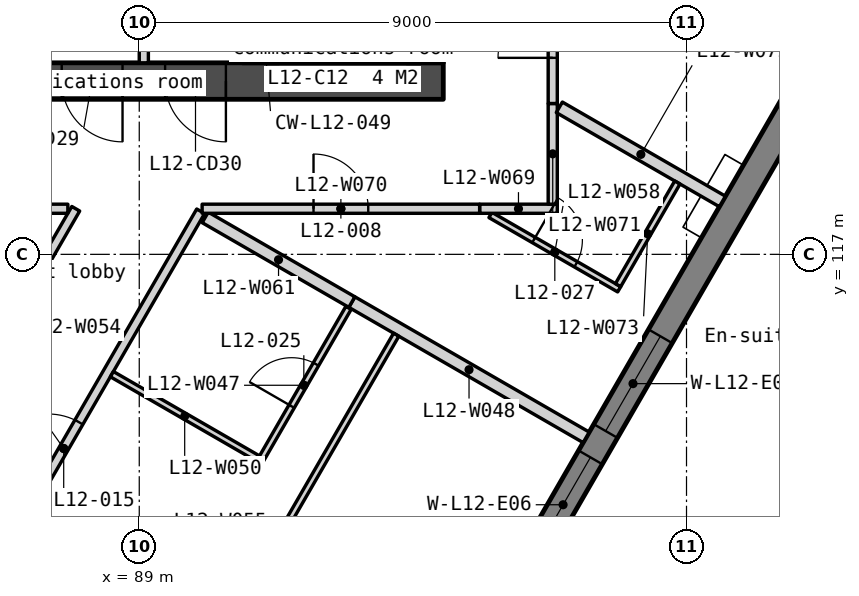
"""IFC4 building model, lengths in metres.
Left out: names, types, materials, properties, quantities, classifications, styles, units other than length and angle.
Written with IfcOpenShell. Run it as: python <this file> out.ifc"""

import sys

from ifc_helpers import new_model, si_unit, direction, frame, frame_2d, origin, place, context, subcontext, project, spatial, polyline, rectangle, outline, extrude, element, fill, save


model = new_model("IFC4")
c1 = context("Model", 3, precision=1e-05, world=origin(), true_north=direction((0.0, 1.0)))
c2 = subcontext(c1, "Body", "Model", "MODEL_VIEW")
j1 = project(units=[si_unit("LENGTHUNIT", "METRE"), si_unit("PLANEANGLEUNIT", "RADIAN")], contexts=[c1])
p1 = place(None, origin())
s1 = spatial("IfcSite", under=j1, at=p1, CompositionType="ELEMENT")
p2 = place(p1, origin())
s2 = spatial("IfcBuilding", under=s1, at=p2, CompositionType="ELEMENT")
p3 = place(p2, frame((0.0, 0.0, 56.0)))
s3 = spatial("IfcBuildingStorey", under=s2, at=p3, CompositionType="ELEMENT", Elevation=56.0)
p4 = place(p3, frame((66.0, 119.85, 0.0), z_axis=(0.0, 0.0, 1.0), x_axis=(1.0, 0.0, 0.0)))
e1 = element("IfcWall", 1, at=p4, inside=s3, PredefinedType="SOLIDWALL", context=c2, shape_type="SweptSolid", body=[
    extrude(rectangle(XDim=28.0, YDim=0.6, at=frame_2d((14.0, 0.0))), origin(), (0.0, 0.0, 1.0), 3.35),
])
p5 = place(p4, frame((6.825, 0.0, 0.0)))
e2 = element("IfcOpeningElement", 2, at=p5, cuts=e1, PredefinedType="OPENING", context=c2, shape_type="SweptSolid", body=[
    extrude(rectangle(XDim=1.8, YDim=2.1, at=frame_2d((0.9, 1.05))), frame((0.0, 0.31, 0.0), z_axis=(0.0, -1.0, 0.0), x_axis=(1.0, 0.0, 0.0)), (0.0, 0.0, 1.0), 0.62),
])
p6 = place(p4, frame((15.85, 0.0, 0.0)))
e3 = element("IfcOpeningElement", 3, at=p6, cuts=e1, PredefinedType="OPENING", context=c2, shape_type="SweptSolid", body=[
    extrude(rectangle(XDim=1.5, YDim=2.1, at=frame_2d((0.75, 1.05))), frame((0.0, 0.31, 0.0), z_axis=(0.0, -1.0, 0.0), x_axis=(1.0, 0.0, 0.0)), (0.0, 0.0, 1.0), 0.62),
])
p7 = place(p4, frame((19.375, 0.0, 0.0)))
e4 = element("IfcOpeningElement", 4, at=p7, cuts=e1, PredefinedType="OPENING", context=c2, shape_type="SweptSolid", body=[
    extrude(rectangle(XDim=1.8, YDim=2.1, at=frame_2d((0.9, 1.05))), frame((0.0, 0.31, 0.0), z_axis=(0.0, -1.0, 0.0), x_axis=(1.0, 0.0, 0.0)), (0.0, 0.0, 1.0), 0.62),
])
p8 = place(p4, frame((4.425, 0.0, 0.0)))
e5 = element("IfcOpeningElement", 5, at=p8, cuts=e1, PredefinedType="OPENING", context=c2, shape_type="SweptSolid", body=[
    extrude(rectangle(XDim=1.0, YDim=2.1, at=frame_2d((0.5, 1.05))), frame((0.0, 0.31, 0.0), z_axis=(0.0, -1.0, 0.0), x_axis=(1.0, 0.0, 0.0)), (0.0, 0.0, 1.0), 0.62),
])
p9 = place(p4, frame((9.783, 0.0, 0.0)))
e6 = element("IfcOpeningElement", 6, at=p9, cuts=e1, PredefinedType="OPENING", context=c2, shape_type="SweptSolid", body=[
    extrude(rectangle(XDim=1.0, YDim=2.1, at=frame_2d((0.5, 1.05))), frame((0.0, 0.31, 0.0), z_axis=(0.0, -1.0, 0.0), x_axis=(1.0, 0.0, 0.0)), (0.0, 0.0, 1.0), 0.62),
])
p10 = place(p4, frame((11.525, 0.0, 0.0)))
e7 = element("IfcOpeningElement", 7, at=p10, cuts=e1, PredefinedType="OPENING", context=c2, shape_type="SweptSolid", body=[
    extrude(rectangle(XDim=1.0, YDim=2.1, at=frame_2d((0.5, 1.05))), frame((0.0, 0.31, 0.0), z_axis=(0.0, -1.0, 0.0), x_axis=(1.0, 0.0, 0.0)), (0.0, 0.0, 1.0), 0.62),
])
p11 = place(p4, frame((13.658, 0.0, 0.0)))
e8 = element("IfcOpeningElement", 8, at=p11, cuts=e1, PredefinedType="OPENING", context=c2, shape_type="SweptSolid", body=[
    extrude(rectangle(XDim=1.0, YDim=2.1, at=frame_2d((0.5, 1.05))), frame((0.0, 0.31, 0.0), z_axis=(0.0, -1.0, 0.0), x_axis=(1.0, 0.0, 0.0)), (0.0, 0.0, 1.0), 0.62),
])
p12 = place(p4, frame((21.725, 0.0, 0.0)))
e9 = element("IfcOpeningElement", 9, at=p12, cuts=e1, PredefinedType="OPENING", context=c2, shape_type="SweptSolid", body=[
    extrude(rectangle(XDim=1.0, YDim=2.1, at=frame_2d((0.5, 1.05))), frame((0.0, 0.31, 0.0), z_axis=(0.0, -1.0, 0.0), x_axis=(1.0, 0.0, 0.0)), (0.0, 0.0, 1.0), 0.62),
])
p13 = place(p4, frame((23.425, 0.0, 0.0)))
e10 = element("IfcOpeningElement", 10, at=p13, cuts=e1, PredefinedType="OPENING", context=c2, shape_type="SweptSolid", body=[
    extrude(rectangle(XDim=1.0, YDim=2.1, at=frame_2d((0.5, 1.05))), frame((0.0, 0.31, 0.0), z_axis=(0.0, -1.0, 0.0), x_axis=(1.0, 0.0, 0.0)), (0.0, 0.0, 1.0), 0.62),
])
p14 = place(p3, frame((89.075, 122.25, 0.0), z_axis=(0.0, 0.0, 1.0), x_axis=(0.0, -1.0, 0.0)))
e11 = element("IfcWall", 11, at=p14, inside=s3, PredefinedType="PARTITIONING", context=c2, shape_type="SweptSolid", body=[
    extrude(rectangle(XDim=2.1, YDim=0.15, at=frame_2d((1.05, 0.0))), origin(), (0.0, 0.0, 1.0), 3.35),
])
p15 = place(p3, frame((91.0, 122.25, 0.0), z_axis=(0.0, 0.0, 1.0), x_axis=(0.0, -1.0, 0.0)))
e12 = element("IfcWall", 12, at=p15, inside=s3, PredefinedType="SOLIDWALL", context=c2, shape_type="SweptSolid", body=[
    extrude(rectangle(XDim=2.1, YDim=0.6, at=frame_2d((1.05, 0.0))), origin(), (0.0, 0.0, 1.0), 3.35),
])
p16 = place(p3, frame((93.7, 133.95, 0.0), z_axis=(0.0, 0.0, 1.0), x_axis=(0.0, -1.0, 0.0)))
e13 = element("IfcWall", 13, at=p16, inside=s3, PredefinedType="SOLIDWALL", context=c2, shape_type="SweptSolid", body=[
    extrude(rectangle(XDim=13.8, YDim=0.6, at=frame_2d((6.9, 0.0))), origin(), (0.0, 0.0, 1.0), 3.35),
])
p17 = place(p16, frame((0.6, 0.0, 0.0)))
e14 = element("IfcOpeningElement", 14, at=p17, cuts=e13, PredefinedType="OPENING", context=c2, shape_type="SweptSolid", body=[
    extrude(rectangle(XDim=1.1, YDim=2.1, at=frame_2d((0.55, 1.05))), frame((0.0, 0.31, 0.0), z_axis=(0.0, -1.0, 0.0), x_axis=(1.0, 0.0, 0.0)), (0.0, 0.0, 1.0), 0.62),
])
p18 = place(p16, frame((8.35, 0.0, 0.0)))
e15 = element("IfcOpeningElement", 15, at=p18, cuts=e13, PredefinedType="OPENING", context=c2, shape_type="SweptSolid", body=[
    extrude(rectangle(XDim=0.826, YDim=2.1, at=frame_2d((0.413, 1.05))), frame((0.0, 0.31, 0.0), z_axis=(0.0, -1.0, 0.0), x_axis=(1.0, 0.0, 0.0)), (0.0, 0.0, 1.0), 0.62),
])
p19 = place(p16, frame((10.071, 0.0, 0.0)))
e16 = element("IfcOpeningElement", 16, at=p19, cuts=e13, PredefinedType="OPENING", context=c2, shape_type="SweptSolid", body=[
    extrude(rectangle(XDim=1.0, YDim=2.1, at=frame_2d((0.5, 1.05))), frame((0.0, 0.31, 0.0), z_axis=(0.0, -1.0, 0.0), x_axis=(1.0, 0.0, 0.0)), (0.0, 0.0, 1.0), 0.62),
])
p20 = place(p16, frame((12.258, 0.0, 0.0)))
e17 = element("IfcOpeningElement", 17, at=p20, cuts=e13, PredefinedType="OPENING", context=c2, shape_type="SweptSolid", body=[
    extrude(rectangle(XDim=1.0, YDim=2.1, at=frame_2d((0.5, 1.05))), frame((0.0, 0.31, 0.0), z_axis=(0.0, -1.0, 0.0), x_axis=(1.0, 0.0, 0.0)), (0.0, 0.0, 1.0), 0.62),
])
p21 = place(p3, frame((83.105, 90.599, -0.15), z_axis=(0.0, 0.0, 1.0), x_axis=(0.499999201451, 0.866025864826, 0.0)))
e18 = element("IfcWall", 18, at=p21, inside=s3, PredefinedType="SOLIDWALL", context=c2, shape_type="SweptSolid", body=[
    extrude(outline(polyline([(44.8, 0.0), (44.8, 3.5), (0.0, 3.5), (0.0, 0.0), (44.8, 0.0)])), frame((0.0, 0.225, 0.0), z_axis=(0.0, -1.0, 0.0), x_axis=(1.0, 0.0, 0.0)), (0.0, 0.0, 1.0), 0.45),
])
p22 = place(p21, frame((0.786, 0.0, 1.05)))
e19 = element("IfcOpeningElement", 19, at=p22, cuts=e18, PredefinedType="OPENING", context=c2, shape_type="SweptSolid", body=[
    extrude(rectangle(XDim=1.2, YDim=1.5, at=frame_2d((0.6, 0.75))), frame((0.0, 0.235, 0.0), z_axis=(0.0, -1.0, 0.0), x_axis=(1.0, 0.0, 0.0)), (0.0, 0.0, 1.0), 0.47),
])
p23 = place(p21, frame((6.91, 0.0, 1.05)))
e20 = element("IfcOpeningElement", 20, at=p23, cuts=e18, PredefinedType="OPENING", context=c2, shape_type="SweptSolid", body=[
    extrude(rectangle(XDim=1.8, YDim=1.5, at=frame_2d((0.9, 0.75))), frame((0.0, 0.235, 0.0), z_axis=(0.0, -1.0, 0.0), x_axis=(1.0, 0.0, 0.0)), (0.0, 0.0, 1.0), 0.47),
])
p24 = place(p21, frame((9.21, 0.0, 1.05)))
e21 = element("IfcOpeningElement", 21, at=p24, cuts=e18, PredefinedType="OPENING", context=c2, shape_type="SweptSolid", body=[
    extrude(rectangle(XDim=1.8, YDim=1.5, at=frame_2d((0.9, 0.75))), frame((0.0, 0.235, 0.0), z_axis=(0.0, -1.0, 0.0), x_axis=(1.0, 0.0, 0.0)), (0.0, 0.0, 1.0), 0.47),
])
p25 = place(p21, frame((15.87, 0.0, 1.05)))
e22 = element("IfcOpeningElement", 22, at=p25, cuts=e18, PredefinedType="OPENING", context=c2, shape_type="SweptSolid", body=[
    extrude(rectangle(XDim=1.8, YDim=1.5, at=frame_2d((0.9, 0.75))), frame((0.0, 0.235, 0.0), z_axis=(0.0, -1.0, 0.0), x_axis=(1.0, 0.0, 0.0)), (0.0, 0.0, 1.0), 0.47),
])
p26 = place(p21, frame((18.17, 0.0, 1.05)))
e23 = element("IfcOpeningElement", 23, at=p26, cuts=e18, PredefinedType="OPENING", context=c2, shape_type="SweptSolid", body=[
    extrude(rectangle(XDim=1.8, YDim=1.5, at=frame_2d((0.9, 0.75))), frame((0.0, 0.235, 0.0), z_axis=(0.0, -1.0, 0.0), x_axis=(1.0, 0.0, 0.0)), (0.0, 0.0, 1.0), 0.47),
])
p27 = place(p21, frame((24.83, 0.0, 1.05)))
e24 = element("IfcOpeningElement", 24, at=p27, cuts=e18, PredefinedType="OPENING", context=c2, shape_type="SweptSolid", body=[
    extrude(rectangle(XDim=1.8, YDim=1.5, at=frame_2d((0.9, 0.75))), frame((0.0, 0.235, 0.0), z_axis=(0.0, -1.0, 0.0), x_axis=(1.0, 0.0, 0.0)), (0.0, 0.0, 1.0), 0.47),
])
p28 = place(p21, frame((27.13, 0.0, 1.05)))
e25 = element("IfcOpeningElement", 25, at=p28, cuts=e18, PredefinedType="OPENING", context=c2, shape_type="SweptSolid", body=[
    extrude(rectangle(XDim=1.8, YDim=1.5, at=frame_2d((0.9, 0.75))), frame((0.0, 0.235, 0.0), z_axis=(0.0, -1.0, 0.0), x_axis=(1.0, 0.0, 0.0)), (0.0, 0.0, 1.0), 0.47),
])
p29 = place(p21, frame((33.79, 0.0, 1.05)))
e26 = element("IfcOpeningElement", 26, at=p29, cuts=e18, PredefinedType="OPENING", context=c2, shape_type="SweptSolid", body=[
    extrude(rectangle(XDim=1.8, YDim=1.5, at=frame_2d((0.9, 0.75))), frame((0.0, 0.235, 0.0), z_axis=(0.0, -1.0, 0.0), x_axis=(1.0, 0.0, 0.0)), (0.0, 0.0, 1.0), 0.47),
])
p30 = place(p21, frame((36.09, 0.0, 1.05)))
e27 = element("IfcOpeningElement", 27, at=p30, cuts=e18, PredefinedType="OPENING", context=c2, shape_type="SweptSolid", body=[
    extrude(rectangle(XDim=1.8, YDim=1.5, at=frame_2d((0.9, 0.75))), frame((0.0, 0.235, 0.0), z_axis=(0.0, -1.0, 0.0), x_axis=(1.0, 0.0, 0.0)), (0.0, 0.0, 1.0), 0.47),
])
p31 = place(p21, frame((42.814, 0.0, 1.05)))
e28 = element("IfcOpeningElement", 28, at=p31, cuts=e18, PredefinedType="OPENING", context=c2, shape_type="SweptSolid", body=[
    extrude(rectangle(XDim=1.2, YDim=1.5, at=frame_2d((0.6, 0.75))), frame((0.0, 0.235, 0.0), z_axis=(0.0, -1.0, 0.0), x_axis=(1.0, 0.0, 0.0)), (0.0, 0.0, 1.0), 0.47),
])
p32 = place(p3, frame((85.505, 109.906, 0.0), z_axis=(0.0, 0.0, 1.0), x_axis=(0.500017993482, 0.866015014994, 0.0)))
e29 = element("IfcWall", 29, at=p32, inside=s3, PredefinedType="PARTITIONING", context=c2, shape_type="SweptSolid", body=[
    extrude(rectangle(XDim=9.01, YDim=0.15, at=frame_2d((4.505, 0.0))), origin(), (0.0, 0.0, 1.0), 3.35),
])
p33 = place(p32, frame((4.005, 0.0, 0.0)))
e30 = element("IfcOpeningElement", 30, at=p33, cuts=e29, PredefinedType="OPENING", context=c2, shape_type="SweptSolid", body=[
    extrude(rectangle(XDim=1.0, YDim=2.1, at=frame_2d((0.5, 1.05))), frame((0.0, 0.085, 0.0), z_axis=(0.0, -1.0, 0.0), x_axis=(1.0, 0.0, 0.0)), (0.0, 0.0, 1.0), 0.17),
])
p34 = place(p3, frame((90.971, 113.574, 0.0), z_axis=(0.0, 0.0, 1.0), x_axis=(0.499988418424, 0.866032090307, 0.0)))
e31 = element("IfcWall", 31, at=p34, inside=s3, PredefinedType="PARTITIONING", context=c2, shape_type="SweptSolid", body=[
    extrude(rectangle(XDim=2.94, YDim=0.1, at=frame_2d((1.47, 0.0))), origin(), (0.0, 0.0, 1.0), 3.35),
])
p35 = place(p34, frame((1.07, 0.0, 0.0)))
e32 = element("IfcOpeningElement", 32, at=p35, cuts=e31, PredefinedType="OPENING", context=c2, shape_type="SweptSolid", body=[
    extrude(rectangle(XDim=0.8, YDim=2.1, at=frame_2d((0.4, 1.05))), frame((0.0, 0.06, 0.0), z_axis=(0.0, -1.0, 0.0), x_axis=(1.0, 0.0, 0.0)), (0.0, 0.0, 1.0), 0.12),
])
p36 = place(p3, frame((92.497, 116.215, 0.0), z_axis=(0.0, 0.0, 1.0), x_axis=(0.866012907634, -0.500021643343, 0.0)))
e33 = element("IfcWall", 33, at=p36, inside=s3, PredefinedType="PARTITIONING", context=c2, shape_type="SweptSolid", body=[
    extrude(rectangle(XDim=4.45, YDim=0.2, at=frame_2d((2.225, 0.0))), origin(), (0.0, 0.0, 1.0), 3.35),
])
p37 = place(p3, frame((88.55, 115.03, 0.0), z_axis=(0.0, 0.0, 1.0), x_axis=(0.866012076814, -0.50002308228, 0.0)))
e34 = element("IfcWall", 34, at=p37, inside=s3, PredefinedType="PARTITIONING", context=c2, shape_type="SweptSolid", body=[
    extrude(rectangle(XDim=2.765, YDim=0.1, at=frame_2d((1.382, 0.0))), origin(), (0.0, 0.0, 1.0), 3.35),
])
p38 = place(p3, frame((86.506, 115.24, 0.0), z_axis=(0.0, 0.0, 1.0), x_axis=(0.500016544581, 0.866015851556, 0.0)))
e35 = element("IfcWall", 35, at=p38, inside=s3, PredefinedType="PARTITIONING", context=c2, shape_type="SweptSolid", body=[
    extrude(rectangle(XDim=2.898, YDim=0.15, at=frame_2d((1.449, 0.0))), origin(), (0.0, 0.0, 1.0), 3.35),
])
p39 = place(p3, frame((88.851, 108.101, 0.0), z_axis=(0.0, 0.0, 1.0), x_axis=(0.500004234368, 0.866022959057, 0.0)))
e36 = element("IfcWall", 36, at=p39, inside=s3, PredefinedType="PARTITIONING", context=c2, shape_type="SweptSolid", body=[
    extrude(rectangle(XDim=8.75, YDim=0.1, at=frame_2d((4.375, 0.0))), origin(), (0.0, 0.0, 1.0), 3.35),
])
p40 = place(p39, frame((3.925, 0.0, 0.0)))
e37 = element("IfcOpeningElement", 37, at=p40, cuts=e36, PredefinedType="OPENING", context=c2, shape_type="SweptSolid", body=[
    extrude(rectangle(XDim=0.9, YDim=2.1, at=frame_2d((0.45, 1.05))), frame((0.0, 0.06, 0.0), z_axis=(0.0, -1.0, 0.0), x_axis=(1.0, 0.0, 0.0)), (0.0, 0.0, 1.0), 0.12),
])
p41 = place(p3, frame((94.775, 117.647, 0.0), z_axis=(0.0, 0.0, 1.0), x_axis=(0.86604092097, -0.499973122483, 0.0)))
e38 = element("IfcWall", 38, at=p41, inside=s3, PredefinedType="PARTITIONING", context=c2, shape_type="SweptSolid", body=[
    extrude(rectangle(XDim=2.445, YDim=0.1, at=frame_2d((1.223, 0.0))), origin(), (0.0, 0.0, 1.0), 3.35),
])
p42 = place(p41, frame((0.823, 0.0, 0.0)))
e39 = element("IfcOpeningElement", 39, at=p42, cuts=e38, PredefinedType="OPENING", context=c2, shape_type="SweptSolid", body=[
    extrude(rectangle(XDim=0.8, YDim=2.1, at=frame_2d((0.4, 1.05))), frame((0.0, 0.06, 0.0), z_axis=(0.0, -1.0, 0.0), x_axis=(1.0, 0.0, 0.0)), (0.0, 0.0, 1.0), 0.12),
])
p43 = place(p3, frame((90.085, 117.608, 0.0), z_axis=(0.0, 0.0, 1.0), x_axis=(0.866011863948, -0.500023450952, 0.0)))
e40 = element("IfcWall", 40, at=p43, inside=s3, PredefinedType="PARTITIONING", context=c2, shape_type="SweptSolid", body=[
    extrude(rectangle(XDim=2.785, YDim=0.2, at=frame_2d((1.393, 0.0))), origin(), (0.0, 0.0, 1.0), 3.35),
])
p44 = place(p3, frame((76.216, 117.75, 0.0), z_axis=(0.0, 0.0, 1.0), x_axis=(1.0, 0.0, 0.0)))
e41 = element("IfcWall", 41, at=p44, inside=s3, PredefinedType="PARTITIONING", context=c2, shape_type="SweptSolid", body=[
    extrude(rectangle(XDim=11.61, YDim=0.15, at=frame_2d((5.805, 0.0))), origin(), (0.0, 0.0, 1.0), 3.35),
])
p45 = place(p44, frame((5.355, 0.0, 0.0)))
e42 = element("IfcOpeningElement", 42, at=p45, cuts=e41, PredefinedType="OPENING", context=c2, shape_type="SweptSolid", body=[
    extrude(rectangle(XDim=0.9, YDim=2.1, at=frame_2d((0.45, 1.05))), frame((0.0, 0.085, 0.0), z_axis=(0.0, -1.0, 0.0), x_axis=(1.0, 0.0, 0.0)), (0.0, 0.0, 1.0), 0.17),
])
p46 = place(p3, frame((94.598, 117.75, 0.0), z_axis=(0.0, 0.0, 1.0), x_axis=(1.0, 0.0, 0.0)))
e43 = element("IfcWall", 43, at=p46, inside=s3, PredefinedType="PARTITIONING", context=c2, shape_type="SweptSolid", body=[
    extrude(rectangle(XDim=1.277, YDim=0.15, at=frame_2d((0.639, 0.0))), origin(), (0.0, 0.0, 1.0), 3.35),
])
p47 = place(p3, frame((90.034, 117.75, 0.0), z_axis=(0.0, 0.0, 1.0), x_axis=(1.0, 0.0, 0.0)))
e44 = element("IfcWall", 44, at=p47, inside=s3, PredefinedType="PARTITIONING", context=c2, shape_type="SweptSolid", body=[
    extrude(rectangle(XDim=4.564, YDim=0.15, at=frame_2d((2.282, 0.0))), origin(), (0.0, 0.0, 1.0), 3.35),
])
p48 = place(p47, frame((1.832, 0.0, 0.0)))
e45 = element("IfcOpeningElement", 45, at=p48, cuts=e44, PredefinedType="OPENING", context=c2, shape_type="SweptSolid", body=[
    extrude(rectangle(XDim=0.9, YDim=2.1, at=frame_2d((0.45, 1.05))), frame((0.0, 0.085, 0.0), z_axis=(0.0, -1.0, 0.0), x_axis=(1.0, 0.0, 0.0)), (0.0, 0.0, 1.0), 0.17),
])
p49 = place(p3, frame((95.8, 117.825, 0.0), z_axis=(0.0, 0.0, 1.0), x_axis=(0.0, 1.0, 0.0)))
e46 = element("IfcWall", 46, at=p49, inside=s3, PredefinedType="PARTITIONING", context=c2, shape_type="SweptSolid", body=[
    extrude(rectangle(XDim=1.656, YDim=0.15, at=frame_2d((0.828, 0.0))), origin(), (0.0, 0.0, 1.0), 3.35),
])
p50 = place(p3, frame((95.908, 119.418, 0.0), z_axis=(0.0, 0.0, 1.0), x_axis=(0.866051688794, -0.499954470265, 0.0)))
e47 = element("IfcWall", 47, at=p50, inside=s3, PredefinedType="PARTITIONING", context=c2, shape_type="SweptSolid", body=[
    extrude(rectangle(XDim=3.097, YDim=0.2, at=frame_2d((1.548, 0.0))), origin(), (0.0, 0.0, 1.0), 3.35),
])
p51 = place(p3, frame((96.875, 116.493, 0.0), z_axis=(0.0, 0.0, 1.0), x_axis=(0.500043961785, 0.866000020948, 0.0)))
e48 = element("IfcWall", 48, at=p51, inside=s3, PredefinedType="PARTITIONING", context=c2, shape_type="SweptSolid", body=[
    extrude(rectangle(XDim=1.95, YDim=0.1, at=frame_2d((0.975, 0.0))), origin(), (0.0, 0.0, 1.0), 3.35),
])
p52 = place(p3, frame((95.8, 119.481, 0.0), z_axis=(0.0, 0.0, 1.0), x_axis=(0.0, 1.0, 0.0)))
e49 = element("IfcWall", 49, at=p52, inside=s3, PredefinedType="PARTITIONING", context=c2, shape_type="SweptSolid", body=[
    extrude(rectangle(XDim=2.402, YDim=0.15, at=frame_2d((1.201, 0.0))), origin(), (0.0, 0.0, 1.0), 3.35),
])
p53 = place(p52, frame((0.751, 0.0, 0.0)))
e50 = element("IfcOpeningElement", 50, at=p53, cuts=e49, PredefinedType="OPENING", context=c2, shape_type="SweptSolid", body=[
    extrude(rectangle(XDim=0.9, YDim=2.1, at=frame_2d((0.45, 1.05))), frame((0.0, 0.085, 0.0), z_axis=(0.0, -1.0, 0.0), x_axis=(1.0, 0.0, 0.0)), (0.0, 0.0, 1.0), 0.17),
])
p54 = place(p12, origin())
e51 = element("IfcDoor", 51, at=p54, inside=s3, OperationType="SINGLE_SWING_RIGHT", PredefinedType="DOOR", context=c2, shape_type="SweptSolid", body=[
    extrude(rectangle(XDim=1.0, YDim=2.1, at=frame_2d((0.5, 1.05))), frame((0.0, 0.025, 0.0), z_axis=(0.0, -1.0, 0.0), x_axis=(1.0, 0.0, 0.0)), (0.0, 0.0, 1.0), 0.05),
])
fill(e9, e51)
p55 = place(p13, origin())
e52 = element("IfcDoor", 52, at=p55, inside=s3, OperationType="SINGLE_SWING_RIGHT", PredefinedType="DOOR", context=c2, shape_type="SweptSolid", body=[
    extrude(rectangle(XDim=1.0, YDim=2.1, at=frame_2d((0.5, 1.05))), frame((0.0, 0.025, 0.0), z_axis=(0.0, -1.0, 0.0), x_axis=(1.0, 0.0, 0.0)), (0.0, 0.0, 1.0), 0.05),
])
fill(e10, e52)
p56 = place(p27, origin())
e53 = element("IfcWindow", 53, at=p56, inside=s3, PartitioningType="SINGLE_PANEL", PredefinedType="WINDOW", context=c2, shape_type="SweptSolid", body=[
    extrude(rectangle(XDim=1.8, YDim=1.5, at=frame_2d((0.9, 0.75))), frame((0.0, 0.03, 0.0), z_axis=(0.0, -1.0, 0.0), x_axis=(1.0, 0.0, 0.0)), (0.0, 0.0, 1.0), 0.06),
])
fill(e24, e53)
p57 = place(p28, origin())
e54 = element("IfcWindow", 54, at=p57, inside=s3, PartitioningType="SINGLE_PANEL", PredefinedType="WINDOW", context=c2, shape_type="SweptSolid", body=[
    extrude(rectangle(XDim=1.8, YDim=1.5, at=frame_2d((0.9, 0.75))), frame((0.0, 0.03, 0.0), z_axis=(0.0, -1.0, 0.0), x_axis=(1.0, 0.0, 0.0)), (0.0, 0.0, 1.0), 0.06),
])
fill(e25, e54)
p58 = place(p48, origin())
e55 = element("IfcDoor", 55, at=p58, inside=s3, OperationType="SINGLE_SWING_LEFT", PredefinedType="DOOR", context=c2, shape_type="SweptSolid", body=[
    extrude(rectangle(XDim=0.9, YDim=2.1, at=frame_2d((0.45, 1.05))), frame((0.0, 0.025, 0.0), z_axis=(0.0, -1.0, 0.0), x_axis=(1.0, 0.0, 0.0)), (0.0, 0.0, 1.0), 0.05),
])
fill(e45, e55)
p59 = place(p53, origin())
e56 = element("IfcDoor", 56, at=p59, inside=s3, OperationType="SINGLE_SWING_LEFT", PredefinedType="DOOR", context=c2, shape_type="SweptSolid", body=[
    extrude(rectangle(XDim=0.9, YDim=2.1, at=frame_2d((0.45, 1.05))), frame((0.0, 0.025, 0.0), z_axis=(0.0, -1.0, 0.0), x_axis=(1.0, 0.0, 0.0)), (0.0, 0.0, 1.0), 0.05),
])
fill(e50, e56)
p60 = place(p33, origin())
e57 = element("IfcDoor", 57, at=p60, inside=s3, OperationType="SINGLE_SWING_LEFT", PredefinedType="DOOR", context=c2, shape_type="SweptSolid", body=[
    extrude(rectangle(XDim=1.0, YDim=2.1, at=frame_2d((0.5, 1.05))), frame((0.0, 0.025, 0.0), z_axis=(0.0, -1.0, 0.0), x_axis=(1.0, 0.0, 0.0)), (0.0, 0.0, 1.0), 0.05),
])
fill(e30, e57)
p61 = place(p35, origin())
e58 = element("IfcDoor", 58, at=p61, inside=s3, OperationType="SINGLE_SWING_LEFT", PredefinedType="DOOR", context=c2, shape_type="SweptSolid", body=[
    extrude(rectangle(XDim=0.8, YDim=2.1, at=frame_2d((0.4, 1.05))), frame((0.0, 0.025, 0.0), z_axis=(0.0, -1.0, 0.0), x_axis=(1.0, 0.0, 0.0)), (0.0, 0.0, 1.0), 0.05),
])
fill(e32, e58)
p62 = place(p42, origin())
e59 = element("IfcDoor", 59, at=p62, inside=s3, OperationType="SINGLE_SWING_LEFT", PredefinedType="DOOR", context=c2, shape_type="SweptSolid", body=[
    extrude(rectangle(XDim=0.8, YDim=2.1, at=frame_2d((0.4, 1.05))), frame((0.0, 0.025, 0.0), z_axis=(0.0, -1.0, 0.0), x_axis=(1.0, 0.0, 0.0)), (0.0, 0.0, 1.0), 0.05),
])
fill(e39, e59)
save(model, sys.argv[1])
